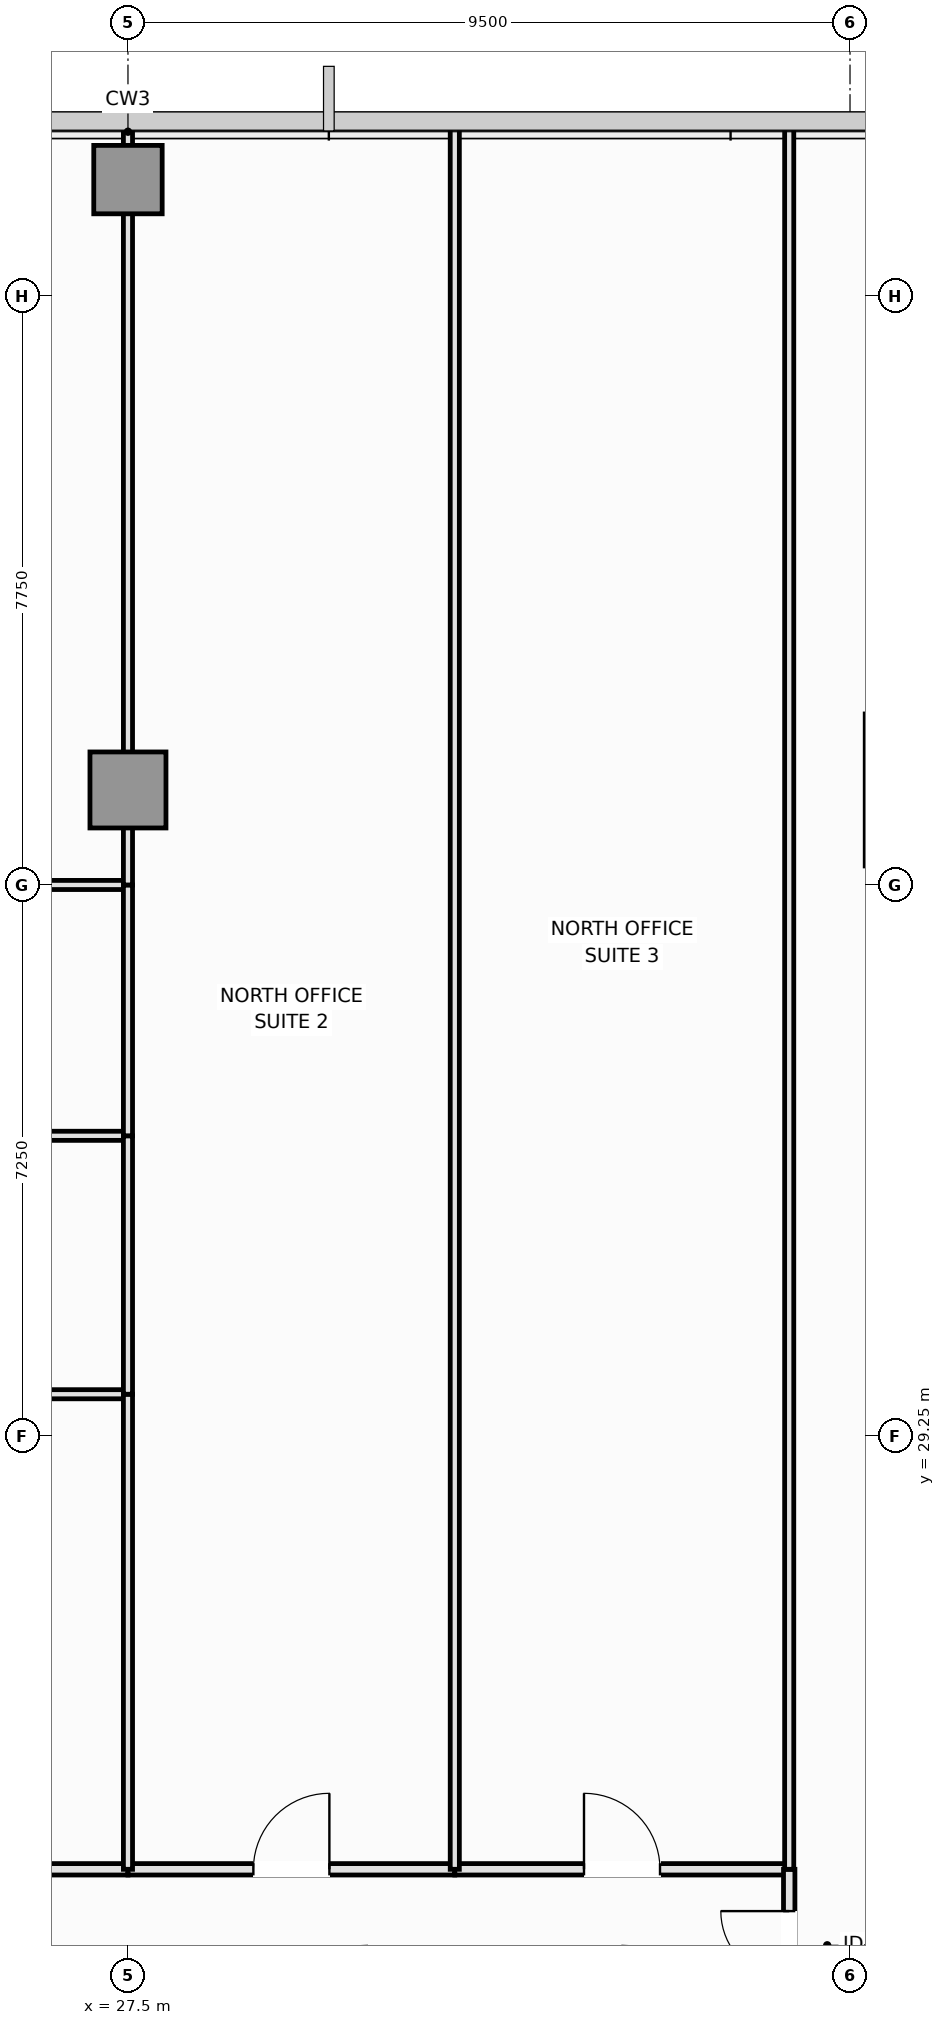
"""IFC4 building model, lengths in metres.
Left out: names, types, materials, properties, quantities, classifications, styles, units other than length and angle.
Written with IfcOpenShell. Run it as: python <this file> out.ifc"""

import sys

from ifc_helpers import new_model, si_unit, direction, frame, frame_2d, origin, origin_2d, place, context, subcontext, project, spatial, rectangle, extrude, element, fill, save


model = new_model("IFC4")
c1 = context("Model", 3, precision=1e-05, world=origin(), true_north=direction((0.0, 1.0)))
c2 = subcontext(c1, "Body", "Model", "MODEL_VIEW")
j1 = project(units=[si_unit("LENGTHUNIT", "METRE"), si_unit("PLANEANGLEUNIT", "RADIAN")], contexts=[c1])
p1 = place(None, origin())
s1 = spatial("IfcSite", under=j1, at=p1, CompositionType="ELEMENT")
p2 = place(p1, origin())
s2 = spatial("IfcBuilding", under=s1, at=p2, CompositionType="ELEMENT")
p3 = place(p2, frame((0.0, 0.0, 134.2)))
s3 = spatial("IfcBuildingStorey", under=s2, at=p3, CompositionType="ELEMENT", Elevation=134.2)
p4 = place(p3, frame((27.5, 37.75, 0.0), z_axis=(0.0, 0.0, 1.0), x_axis=(1.0, 0.0, 0.0)))
e1 = element("IfcColumn", 1, at=p4, inside=s3, PredefinedType="COLUMN", context=c2, shape_type="SweptSolid", body=[
    extrude(rectangle(XDim=1.0, YDim=1.0, at=origin_2d()), origin(), (0.0, 0.0, 1.0), 3.55),
])
p5 = place(p3, frame((27.5, 45.78, 0.0), z_axis=(0.0, 0.0, 1.0), x_axis=(1.0, 0.0, 0.0)))
e2 = element("IfcColumn", 2, at=p5, inside=s3, PredefinedType="COLUMN", context=c2, shape_type="SweptSolid", body=[
    extrude(rectangle(XDim=0.9, YDim=0.9, at=origin_2d()), origin(), (0.0, 0.0, 1.0), 3.55),
])
p6 = place(p3, frame((19.95, 23.55, 0.0), z_axis=(0.0, 0.0, 1.0), x_axis=(1.0, 0.0, 0.0)))
e3 = element("IfcWall", 3, at=p6, inside=s3, PredefinedType="PARTITIONING", context=c2, shape_type="SweptSolid", body=[
    extrude(rectangle(XDim=7.55, YDim=0.15, at=frame_2d((3.775, 0.0))), origin(), (0.0, 0.0, 1.0), 3.37),
])
p7 = place(p3, frame((27.5, 23.55, 0.0), z_axis=(0.0, 0.0, 1.0), x_axis=(1.0, 0.0, 0.0)))
e4 = element("IfcWall", 4, at=p7, inside=s3, PredefinedType="PARTITIONING", context=c2, shape_type="SweptSolid", body=[
    extrude(rectangle(XDim=4.3, YDim=0.15, at=frame_2d((2.15, 0.0))), origin(), (0.0, 0.0, 1.0), 3.37),
])
p8 = place(p7, frame((1.65, 0.0, 0.0)))
e5 = element("IfcOpeningElement", 5, at=p8, cuts=e4, PredefinedType="OPENING", context=c2, shape_type="SweptSolid", body=[
    extrude(rectangle(XDim=1.0, YDim=2.15, at=frame_2d((0.5, 1.075))), frame((0.0, 0.085, 0.0), z_axis=(0.0, -1.0, 0.0), x_axis=(1.0, 0.0, 0.0)), (0.0, 0.0, 1.0), 0.17),
])
p9 = place(p3, frame((31.8, 23.55, 0.0), z_axis=(0.0, 0.0, 1.0), x_axis=(1.0, 0.0, 0.0)))
e6 = element("IfcWall", 6, at=p9, inside=s3, PredefinedType="PARTITIONING", context=c2, shape_type="SweptSolid", body=[
    extrude(rectangle(XDim=4.4, YDim=0.15, at=frame_2d((2.2, 0.0))), origin(), (0.0, 0.0, 1.0), 3.37),
])
p10 = place(p9, frame((1.7, 0.0, 0.0)))
e7 = element("IfcOpeningElement", 7, at=p10, cuts=e6, PredefinedType="OPENING", context=c2, shape_type="SweptSolid", body=[
    extrude(rectangle(XDim=1.0, YDim=2.15, at=frame_2d((0.5, 1.075))), frame((0.0, 0.085, 0.0), z_axis=(0.0, -1.0, 0.0), x_axis=(1.0, 0.0, 0.0)), (0.0, 0.0, 1.0), 0.17),
])
p11 = place(p3, frame((36.2, 21.55, 0.0), z_axis=(0.0, 0.0, 1.0), x_axis=(0.0, 1.0, 0.0)))
e8 = element("IfcWall", 8, at=p11, inside=s3, PredefinedType="PARTITIONING", context=c2, shape_type="SweptSolid", body=[
    extrude(rectangle(XDim=2.0, YDim=0.15, at=frame_2d((1.0, 0.0))), origin(), (0.0, 0.0, 1.0), 3.37),
])
p12 = place(p11, frame((0.55, 0.0, 0.0)))
e9 = element("IfcOpeningElement", 9, at=p12, cuts=e8, PredefinedType="OPENING", context=c2, shape_type="SweptSolid", body=[
    extrude(rectangle(XDim=0.9, YDim=2.1, at=frame_2d((0.45, 1.05))), frame((0.0, 0.085, 0.0), z_axis=(0.0, -1.0, 0.0), x_axis=(1.0, 0.0, 0.0)), (0.0, 0.0, 1.0), 0.17),
])
p13 = place(p3, frame((19.95, 29.8, 0.0), z_axis=(0.0, 0.0, 1.0), x_axis=(1.0, 0.0, 0.0)))
e10 = element("IfcWall", 10, at=p13, inside=s3, PredefinedType="PARTITIONING", context=c2, shape_type="SweptSolid", body=[
    extrude(rectangle(XDim=7.55, YDim=0.12, at=frame_2d((3.775, 0.0))), origin(), (0.0, 0.0, 1.0), 3.37),
])
p14 = place(p3, frame((27.5, 23.55, 0.0), z_axis=(0.0, 0.0, 1.0), x_axis=(0.0, 1.0, 0.0)))
e11 = element("IfcWall", 11, at=p14, inside=s3, PredefinedType="PARTITIONING", context=c2, shape_type="SweptSolid", body=[
    extrude(rectangle(XDim=6.25, YDim=0.12, at=frame_2d((3.125, 0.0))), origin(), (0.0, 0.0, 1.0), 3.37),
])
p15 = place(p3, frame((19.95, 33.2, 0.0), z_axis=(0.0, 0.0, 1.0), x_axis=(1.0, 0.0, 0.0)))
e12 = element("IfcWall", 12, at=p15, inside=s3, PredefinedType="PARTITIONING", context=c2, shape_type="SweptSolid", body=[
    extrude(rectangle(XDim=7.55, YDim=0.12, at=frame_2d((3.775, 0.0))), origin(), (0.0, 0.0, 1.0), 3.37),
])
p16 = place(p3, frame((27.5, 29.8, 0.0), z_axis=(0.0, 0.0, 1.0), x_axis=(0.0, 1.0, 0.0)))
e13 = element("IfcWall", 13, at=p16, inside=s3, PredefinedType="PARTITIONING", context=c2, shape_type="SweptSolid", body=[
    extrude(rectangle(XDim=3.4, YDim=0.12, at=frame_2d((1.7, 0.0))), origin(), (0.0, 0.0, 1.0), 3.37),
])
p17 = place(p3, frame((19.95, 36.5, 0.0), z_axis=(0.0, 0.0, 1.0), x_axis=(1.0, 0.0, 0.0)))
e14 = element("IfcWall", 14, at=p17, inside=s3, PredefinedType="PARTITIONING", context=c2, shape_type="SweptSolid", body=[
    extrude(rectangle(XDim=7.55, YDim=0.12, at=frame_2d((3.775, 0.0))), origin(), (0.0, 0.0, 1.0), 3.37),
])
p18 = place(p3, frame((27.5, 33.2, 0.0), z_axis=(0.0, 0.0, 1.0), x_axis=(0.0, 1.0, 0.0)))
e15 = element("IfcWall", 15, at=p18, inside=s3, PredefinedType="PARTITIONING", context=c2, shape_type="SweptSolid", body=[
    extrude(rectangle(XDim=3.3, YDim=0.12, at=frame_2d((1.65, 0.0))), origin(), (0.0, 0.0, 1.0), 3.37),
])
p19 = place(p3, frame((27.5, 36.5, 0.0), z_axis=(0.0, 0.0, 1.0), x_axis=(0.0, 1.0, 0.0)))
e16 = element("IfcWall", 16, at=p19, inside=s3, PredefinedType="PARTITIONING", context=c2, shape_type="SweptSolid", body=[
    extrude(rectangle(XDim=9.99, YDim=0.12, at=frame_2d((4.995, 0.0))), origin(), (0.0, 0.0, 1.0), 2.87),
])
for number, where, z_axis, x_axis in (
    (17, (31.8, 23.55, 0.0), (0.0, 0.0, 1.0), (0.0, 1.0, 0.0)),
    (18, (36.2, 23.55, 0.0), (0.0, 0.0, 1.0), (0.0, 1.0, 0.0)),
):
    element("IfcWall", number, at=place(p3, frame(where, z_axis=z_axis, x_axis=x_axis)), inside=s3, PredefinedType="PARTITIONING", context=c2, shape_type="SweptSolid", body=[
        extrude(rectangle(XDim=22.94, YDim=0.12, at=frame_2d((11.47, 0.0))), origin(), (0.0, 0.0, 1.0), 3.37),
    ])
p20 = place(p8, origin())
e19 = element("IfcDoor", 19, at=p20, inside=s3, OperationType="SINGLE_SWING_RIGHT", PredefinedType="DOOR", context=c2, shape_type="SweptSolid", body=[
    extrude(rectangle(XDim=1.0, YDim=2.15, at=frame_2d((0.5, 1.075))), frame((0.0, 0.025, 0.0), z_axis=(0.0, -1.0, 0.0), x_axis=(1.0, 0.0, 0.0)), (0.0, 0.0, 1.0), 0.05),
])
fill(e5, e19)
p21 = place(p10, origin())
e20 = element("IfcDoor", 20, at=p21, inside=s3, OperationType="SINGLE_SWING_LEFT", PredefinedType="DOOR", context=c2, shape_type="SweptSolid", body=[
    extrude(rectangle(XDim=1.0, YDim=2.15, at=frame_2d((0.5, 1.075))), frame((0.0, 0.025, 0.0), z_axis=(0.0, -1.0, 0.0), x_axis=(1.0, 0.0, 0.0)), (0.0, 0.0, 1.0), 0.05),
])
fill(e7, e20)
p22 = place(p12, origin())
e21 = element("IfcDoor", 21, at=p22, inside=s3, OperationType="SINGLE_SWING_RIGHT", PredefinedType="DOOR", context=c2, shape_type="SweptSolid", body=[
    extrude(rectangle(XDim=0.9, YDim=2.1, at=frame_2d((0.45, 1.05))), frame((0.0, 0.025, 0.0), z_axis=(0.0, -1.0, 0.0), x_axis=(1.0, 0.0, 0.0)), (0.0, 0.0, 1.0), 0.05),
])
fill(e9, e21)
save(model, sys.argv[1])
